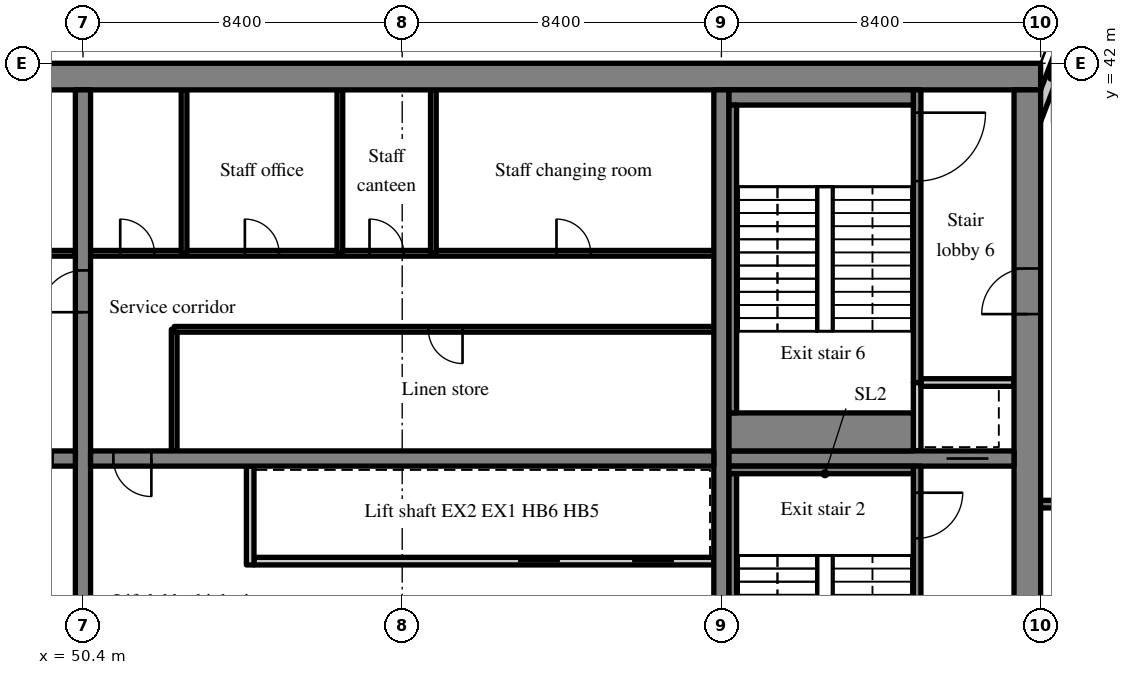
"""IFC4 building model, lengths in metres.
Left out: names, types, materials, properties, quantities, classifications, styles, units other than length and angle.
Written with IfcOpenShell. Run it as: python <this file> out.ifc"""

import sys

from ifc_helpers import new_model, si_unit, direction, frame, frame_2d, origin, place, context, subcontext, project, spatial, rectangle, extrude, source, transform, mapped, element, fill, save


model = new_model("IFC4")
c1 = context("Model", 3, precision=1e-05, world=origin(), true_north=direction((0.0, 1.0)))
c2 = subcontext(c1, "Body", "Model", "MODEL_VIEW")
j1 = project(units=[si_unit("LENGTHUNIT", "METRE"), si_unit("PLANEANGLEUNIT", "RADIAN")], contexts=[c1])
p1 = place(None, origin())
s1 = spatial("IfcSite", under=j1, at=p1, CompositionType="ELEMENT")
p2 = place(p1, origin())
s2 = spatial("IfcBuilding", under=s1, at=p2, CompositionType="ELEMENT")
p3 = place(p2, frame((0.0, 0.0, 174.4)))
s3 = spatial("IfcBuildingStorey", under=s2, at=p3, CompositionType="ELEMENT", Elevation=174.4)
m1 = source(origin(), c2, "Body", "SweptSolid", [
    extrude(rectangle(XDim=50.4, YDim=0.7, at=frame_2d((25.2, 0.0))), origin(), (0.0, 0.0, 1.0), 3.52),
])
p4 = place(p3, frame((25.2, 41.65, 0.0), z_axis=(0.0, 0.0, 1.0), x_axis=(1.0, 0.0, 0.0)))
e1 = element("IfcWall", 1, at=p4, inside=s3, PredefinedType="SHEAR", context=c2, shape_type="MappedRepresentation", body=[
    mapped(m1, transform((0.0, 0.0, 0.0), scale=1.0)),
])
m2 = source(origin(), c2, "Body", "SweptSolid", [
    extrude(rectangle(XDim=18.6, YDim=0.7, at=frame_2d((9.3, 0.0))), origin(), (0.0, 0.0, 1.0), 3.52),
])
p5 = place(p3, frame((75.25, 22.7, 0.0), z_axis=(0.0, 0.0, 1.0), x_axis=(0.0, 1.0, 0.0)))
e2 = element("IfcWall", 2, at=p5, inside=s3, PredefinedType="SHEAR", context=c2, shape_type="MappedRepresentation", body=[
    mapped(m2, transform((0.0, 0.0, 0.0), scale=1.0)),
])
m3 = source(origin(), c2, "Body", "SweptSolid", [
    extrude(rectangle(XDim=1.2, YDim=2.1, at=frame_2d((0.6, 1.05))), frame((0.0, 0.36, 0.0), z_axis=(0.0, -1.0, 0.0), x_axis=(1.0, 0.0, 0.0)), (0.0, 0.0, 1.0), 0.72),
])
p6 = place(p5, frame((12.7, 0.0, 0.0)))
e3 = element("IfcOpeningElement", 3, at=p6, cuts=e2, PredefinedType="OPENING", context=c2, shape_type="MappedRepresentation", body=[
    mapped(m3, transform((0.0, 0.0, 0.0), scale=1.0)),
])
m4 = source(origin(), c2, "Body", "SweptSolid", [
    extrude(rectangle(XDim=18.6, YDim=0.4, at=frame_2d((9.3, 0.0))), origin(), (0.0, 0.0, 1.0), 3.52),
])
p7 = place(p3, frame((50.4, 22.7, 0.0), z_axis=(0.0, 0.0, 1.0), x_axis=(0.0, 1.0, 0.0)))
e4 = element("IfcWall", 4, at=p7, inside=s3, PredefinedType="SHEAR", context=c2, shape_type="MappedRepresentation", body=[
    mapped(m4, transform((0.0, 0.0, 0.0), scale=1.0)),
])
m5 = source(origin(), c2, "Body", "SweptSolid", [
    extrude(rectangle(XDim=1.1, YDim=2.1, at=frame_2d((0.55, 1.05))), frame((0.0, 0.21, 0.0), z_axis=(0.0, -1.0, 0.0), x_axis=(1.0, 0.0, 0.0)), (0.0, 0.0, 1.0), 0.42),
])
p8 = place(p7, frame((12.75, 0.0, 0.0)))
e5 = element("IfcOpeningElement", 5, at=p8, cuts=e4, PredefinedType="OPENING", context=c2, shape_type="MappedRepresentation", body=[
    mapped(m5, transform((0.0, 0.0, 0.0), scale=1.0)),
])
p9 = place(p3, frame((67.2, 22.7, 0.0), z_axis=(0.0, 0.0, 1.0), x_axis=(0.0, 1.0, 0.0)))
e6 = element("IfcWall", 6, at=p9, inside=s3, PredefinedType="SHEAR", context=c2, shape_type="MappedRepresentation", body=[
    mapped(m4, transform((0.0, 0.0, 0.0), scale=1.0)),
])
m6 = source(origin(), c2, "Body", "SweptSolid", [
    extrude(rectangle(XDim=16.4, YDim=0.4, at=frame_2d((8.2, 0.0))), origin(), (0.0, 0.0, 1.0), 3.52),
])
p10 = place(p3, frame((33.8, 31.6, 0.0), z_axis=(0.0, 0.0, 1.0), x_axis=(1.0, 0.0, 0.0)))
e7 = element("IfcWall", 7, at=p10, inside=s3, PredefinedType="SHEAR", context=c2, shape_type="MappedRepresentation", body=[
    mapped(m6, transform((0.0, 0.0, 0.0), scale=1.0)),
])
m7 = source(origin(), c2, "Body", "SweptSolid", [
    extrude(rectangle(XDim=1.0, YDim=2.1, at=frame_2d((0.5, 1.05))), frame((0.0, 0.21, 0.0), z_axis=(0.0, -1.0, 0.0), x_axis=(1.0, 0.0, 0.0)), (0.0, 0.0, 1.0), 0.42),
])
p11 = place(p10, frame((14.8, 0.0, 0.0)))
e8 = element("IfcOpeningElement", 8, at=p11, cuts=e7, PredefinedType="OPENING", context=c2, shape_type="MappedRepresentation", body=[
    mapped(m7, transform((0.0, 0.0, 0.0), scale=1.0)),
])
p12 = place(p3, frame((50.6, 31.6, 0.0), z_axis=(0.0, 0.0, 1.0), x_axis=(1.0, 0.0, 0.0)))
e9 = element("IfcWall", 9, at=p12, inside=s3, PredefinedType="SHEAR", context=c2, shape_type="MappedRepresentation", body=[
    mapped(m6, transform((0.0, 0.0, 0.0), scale=1.0)),
])
p13 = place(p12, frame((0.6, 0.0, 0.0)))
e10 = element("IfcOpeningElement", 10, at=p13, cuts=e9, PredefinedType="OPENING", context=c2, shape_type="MappedRepresentation", body=[
    mapped(m7, transform((0.0, 0.0, 0.0), scale=1.0)),
])
m8 = source(origin(), c2, "Body", "SweptSolid", [
    extrude(rectangle(XDim=7.5, YDim=0.4, at=frame_2d((3.75, 0.0))), origin(), (0.0, 0.0, 1.0), 3.52),
])
p14 = place(p3, frame((67.4, 31.6, 0.0), z_axis=(0.0, 0.0, 1.0), x_axis=(1.0, 0.0, 0.0)))
e11 = element("IfcWall", 11, at=p14, inside=s3, PredefinedType="SHEAR", context=c2, shape_type="MappedRepresentation", body=[
    mapped(m8, transform((0.0, 0.0, 0.0), scale=1.0)),
])
p15 = place(p14, frame((5.725, 0.0, 0.0)))
e12 = element("IfcOpeningElement", 12, at=p15, cuts=e11, PredefinedType="OPENING", context=c2, shape_type="MappedRepresentation", body=[
    mapped(m5, transform((0.0, 0.0, 0.0), scale=1.0)),
])
m9 = source(origin(), c2, "Body", "SweptSolid", [
    extrude(rectangle(XDim=3.559, YDim=0.3, at=frame_2d((1.78, 0.0))), origin(), (0.0, 0.0, 1.0), 3.52),
])
p16 = place(p3, frame((76.523, 43.292, 0.0), z_axis=(0.0, 0.0, 1.0), x_axis=(-0.35779745313, -0.933799219604, 0.0)))
e13 = element("IfcWall", 13, at=p16, inside=s3, PredefinedType="SOLIDWALL", context=c2, shape_type="MappedRepresentation", body=[
    mapped(m9, transform((0.0, 0.0, 0.0), scale=1.0)),
])
m10 = source(origin(), c2, "Body", "SweptSolid", [
    extrude(rectangle(XDim=1.5, YDim=2.0, at=frame_2d((0.75, 1.0))), frame((0.0, 0.16, 0.0), z_axis=(0.0, -1.0, 0.0), x_axis=(1.0, 0.0, 0.0)), (0.0, 0.0, 1.0), 0.32),
])
p17 = place(p16, frame((0.156, 0.0, 0.9)))
e14 = element("IfcOpeningElement", 14, at=p17, cuts=e13, PredefinedType="OPENING", context=c2, shape_type="MappedRepresentation", body=[
    mapped(m10, transform((0.0, 0.0, 0.0), scale=1.0)),
])
m11 = source(origin(), c2, "Body", "SweptSolid", [
    extrude(rectangle(XDim=16.4, YDim=0.15, at=frame_2d((8.2, 0.0))), origin(), (0.0, 0.0, 1.0), 3.52),
])
p18 = place(p3, frame((33.8, 37.0, 0.0), z_axis=(0.0, 0.0, 1.0), x_axis=(1.0, 0.0, 0.0)))
e15 = element("IfcWall", 15, at=p18, inside=s3, PredefinedType="PARTITIONING", context=c2, shape_type="MappedRepresentation", body=[
    mapped(m11, transform((0.0, 0.0, 0.0), scale=1.0)),
])
m12 = source(origin(), c2, "Body", "SweptSolid", [
    extrude(rectangle(XDim=0.9, YDim=2.1, at=frame_2d((0.45, 1.05))), frame((0.0, 0.085, 0.0), z_axis=(0.0, -1.0, 0.0), x_axis=(1.0, 0.0, 0.0)), (0.0, 0.0, 1.0), 0.17),
])
p19 = place(p18, frame((1.6, 0.0, 0.0)))
e16 = element("IfcOpeningElement", 16, at=p19, cuts=e15, PredefinedType="OPENING", context=c2, shape_type="MappedRepresentation", body=[
    mapped(m12, transform((0.0, 0.0, 0.0), scale=1.0)),
])
p20 = place(p18, frame((7.34, 0.0, 0.0)))
e17 = element("IfcOpeningElement", 17, at=p20, cuts=e15, PredefinedType="OPENING", context=c2, shape_type="MappedRepresentation", body=[
    mapped(m12, transform((0.0, 0.0, 0.0), scale=1.0)),
])
p21 = place(p18, frame((12.26, 0.0, 0.0)))
e18 = element("IfcOpeningElement", 18, at=p21, cuts=e15, PredefinedType="OPENING", context=c2, shape_type="MappedRepresentation", body=[
    mapped(m12, transform((0.0, 0.0, 0.0), scale=1.0)),
])
p22 = place(p18, frame((14.72, 0.0, 0.0)))
e19 = element("IfcOpeningElement", 19, at=p22, cuts=e15, PredefinedType="OPENING", context=c2, shape_type="MappedRepresentation", body=[
    mapped(m12, transform((0.0, 0.0, 0.0), scale=1.0)),
])
m13 = source(origin(), c2, "Body", "SweptSolid", [
    extrude(rectangle(XDim=12.1, YDim=0.2, at=frame_2d((6.05, 0.0))), origin(), (0.0, 0.0, 1.0), 3.52),
])
p23 = place(p3, frame((67.0, 28.9, 0.0), z_axis=(0.0, 0.0, 1.0), x_axis=(-1.0, 0.0, 0.0)))
e20 = element("IfcWall", 20, at=p23, inside=s3, PredefinedType="SOLIDWALL", context=c2, shape_type="MappedRepresentation", body=[
    mapped(m13, transform((0.0, 0.0, 0.0), scale=1.0)),
])
m14 = source(origin(), c2, "Body", "SweptSolid", [
    extrude(rectangle(XDim=1.1, YDim=2.1, at=frame_2d((0.55, 1.05))), frame((0.0, 0.11, 0.0), z_axis=(0.0, -1.0, 0.0), x_axis=(1.0, 0.0, 0.0)), (0.0, 0.0, 1.0), 0.22),
])
p24 = place(p23, frame((1.05, 0.0, 0.0)))
e21 = element("IfcOpeningElement", 21, at=p24, cuts=e20, PredefinedType="OPENING", context=c2, shape_type="MappedRepresentation", body=[
    mapped(m14, transform((0.0, 0.0, 0.0), scale=1.0)),
])
p25 = place(p23, frame((4.05, 0.0, 0.0)))
e22 = element("IfcOpeningElement", 22, at=p25, cuts=e20, PredefinedType="OPENING", context=c2, shape_type="MappedRepresentation", body=[
    mapped(m14, transform((0.0, 0.0, 0.0), scale=1.0)),
])
m15 = source(origin(), c2, "Body", "SweptSolid", [
    extrude(rectangle(XDim=2.6, YDim=0.2, at=frame_2d((1.3, 0.0))), origin(), (0.0, 0.0, 1.0), 3.52),
])
p26 = place(p3, frame((54.8, 28.8, 0.0), z_axis=(0.0, 0.0, 1.0), x_axis=(0.0, 1.0, 0.0)))
e23 = element("IfcWall", 23, at=p26, inside=s3, PredefinedType="SOLIDWALL", context=c2, shape_type="MappedRepresentation", body=[
    mapped(m15, transform((0.0, 0.0, 0.0), scale=1.0)),
])
m16 = source(origin(), c2, "Body", "SweptSolid", [
    extrude(rectangle(XDim=3.2, YDim=0.15, at=frame_2d((1.6, 0.0))), origin(), (0.0, 0.0, 1.0), 3.52),
])
p27 = place(p3, frame((52.8, 31.8, 0.0), z_axis=(0.0, 0.0, 1.0), x_axis=(0.0, 1.0, 0.0)))
e24 = element("IfcWall", 24, at=p27, inside=s3, PredefinedType="PARTITIONING", context=c2, shape_type="MappedRepresentation", body=[
    mapped(m16, transform((0.0, 0.0, 0.0), scale=1.0)),
])
m17 = source(origin(), c2, "Body", "SweptSolid", [
    extrude(rectangle(XDim=14.2, YDim=0.15, at=frame_2d((7.1, 0.0))), origin(), (0.0, 0.0, 1.0), 3.52),
])
p28 = place(p3, frame((67.0, 35.0, 0.0), z_axis=(0.0, 0.0, 1.0), x_axis=(-1.0, 0.0, 0.0)))
e25 = element("IfcWall", 25, at=p28, inside=s3, PredefinedType="PARTITIONING", context=c2, shape_type="MappedRepresentation", body=[
    mapped(m17, transform((0.0, 0.0, 0.0), scale=1.0)),
])
p29 = place(p28, frame((6.612, 0.0, 0.0)))
e26 = element("IfcOpeningElement", 26, at=p29, cuts=e25, PredefinedType="OPENING", context=c2, shape_type="MappedRepresentation", body=[
    mapped(m12, transform((0.0, 0.0, 0.0), scale=1.0)),
])
p30 = place(p3, frame((67.0, 37.0, 0.0), z_axis=(0.0, 0.0, 1.0), x_axis=(-1.0, 0.0, 0.0)))
e27 = element("IfcWall", 27, at=p30, inside=s3, PredefinedType="PARTITIONING", context=c2, shape_type="MappedRepresentation", body=[
    mapped(m11, transform((0.0, 0.0, 0.0), scale=1.0)),
])
p31 = place(p30, frame((3.24, 0.0, 0.0)))
e28 = element("IfcOpeningElement", 28, at=p31, cuts=e27, PredefinedType="OPENING", context=c2, shape_type="MappedRepresentation", body=[
    mapped(m12, transform((0.0, 0.0, 0.0), scale=1.0)),
])
p32 = place(p30, frame((8.16, 0.0, 0.0)))
e29 = element("IfcOpeningElement", 29, at=p32, cuts=e27, PredefinedType="OPENING", context=c2, shape_type="MappedRepresentation", body=[
    mapped(m12, transform((0.0, 0.0, 0.0), scale=1.0)),
])
p33 = place(p30, frame((11.44, 0.0, 0.0)))
e30 = element("IfcOpeningElement", 30, at=p33, cuts=e27, PredefinedType="OPENING", context=c2, shape_type="MappedRepresentation", body=[
    mapped(m12, transform((0.0, 0.0, 0.0), scale=1.0)),
])
p34 = place(p30, frame((14.72, 0.0, 0.0)))
e31 = element("IfcOpeningElement", 31, at=p34, cuts=e27, PredefinedType="OPENING", context=c2, shape_type="MappedRepresentation", body=[
    mapped(m12, transform((0.0, 0.0, 0.0), scale=1.0)),
])
m18 = source(origin(), c2, "Body", "SweptSolid", [
    extrude(rectangle(XDim=4.3, YDim=0.15, at=frame_2d((2.15, 0.0))), origin(), (0.0, 0.0, 1.0), 3.52),
])
for number, where, z_axis, x_axis in (
    (32, (59.62, 37.0, 0.0), (0.0, 0.0, 1.0), (0.0, 1.0, 0.0)),
    (33, (57.16, 37.0, 0.0), (0.0, 0.0, 1.0), (0.0, 1.0, 0.0)),
    (34, (53.06, 37.0, 0.0), (0.0, 0.0, 1.0), (0.0, 1.0, 0.0)),
):
    element("IfcWall", number, at=place(p3, frame(where, z_axis=z_axis, x_axis=x_axis)), inside=s3, PredefinedType="PARTITIONING", context=c2, shape_type="MappedRepresentation", body=[
        mapped(m18, transform((0.0, 0.0, 0.0), scale=1.0)),
    ])
m19 = source(origin(), c2, "Body", "SweptSolid", [
    extrude(rectangle(XDim=8.7, YDim=0.2, at=frame_2d((4.35, 0.0))), origin(), (0.0, 0.0, 1.0), 3.52),
])
p35 = place(p3, frame((72.35, 22.7, 0.0), z_axis=(0.0, 0.0, 1.0), x_axis=(0.0, 1.0, 0.0)))
e35 = element("IfcWall", 35, at=p35, inside=s3, PredefinedType="SOLIDWALL", context=c2, shape_type="MappedRepresentation", body=[
    mapped(m19, transform((0.0, 0.0, 0.0), scale=1.0)),
])
m20 = source(origin(), c2, "Body", "SweptSolid", [
    extrude(rectangle(XDim=1.2, YDim=2.1, at=frame_2d((0.6, 1.05))), frame((0.0, 0.11, 0.0), z_axis=(0.0, -1.0, 0.0), x_axis=(1.0, 0.0, 0.0)), (0.0, 0.0, 1.0), 0.22),
])
p36 = place(p35, frame((6.8, 0.0, 0.0)))
e36 = element("IfcOpeningElement", 36, at=p36, cuts=e35, PredefinedType="OPENING", context=c2, shape_type="MappedRepresentation", body=[
    mapped(m20, transform((0.0, 0.0, 0.0), scale=1.0)),
])
m21 = source(origin(), c2, "Body", "SweptSolid", [
    extrude(rectangle(XDim=1.8, YDim=0.2, at=frame_2d((0.9, 0.0))), origin(), (0.0, 0.0, 1.0), 3.52),
])
p37 = place(p3, frame((72.35, 31.8, 0.0), z_axis=(0.0, 0.0, 1.0), x_axis=(0.0, 1.0, 0.0)))
e37 = element("IfcWall", 37, at=p37, inside=s3, PredefinedType="SOLIDWALL", context=c2, shape_type="MappedRepresentation", body=[
    mapped(m21, transform((0.0, 0.0, 0.0), scale=1.0)),
])
m22 = source(origin(), c2, "Body", "SweptSolid", [
    extrude(rectangle(XDim=2.45, YDim=0.2, at=frame_2d((1.225, 0.0))), origin(), (0.0, 0.0, 1.0), 3.52),
])
p38 = place(p3, frame((72.45, 33.6, 0.0), z_axis=(0.0, 0.0, 1.0), x_axis=(1.0, 0.0, 0.0)))
e38 = element("IfcWall", 38, at=p38, inside=s3, PredefinedType="SOLIDWALL", context=c2, shape_type="MappedRepresentation", body=[
    mapped(m22, transform((0.0, 0.0, 0.0), scale=1.0)),
])
m23 = source(origin(), c2, "Body", "SweptSolid", [
    extrude(rectangle(XDim=7.7, YDim=0.2, at=frame_2d((3.85, 0.0))), origin(), (0.0, 0.0, 1.0), 3.52),
])
p39 = place(p3, frame((72.35, 33.6, 0.0), z_axis=(0.0, 0.0, 1.0), x_axis=(0.0, 1.0, 0.0)))
e39 = element("IfcWall", 39, at=p39, inside=s3, PredefinedType="SOLIDWALL", context=c2, shape_type="MappedRepresentation", body=[
    mapped(m23, transform((0.0, 0.0, 0.0), scale=1.0)),
])
m24 = source(origin(), c2, "Body", "SweptSolid", [
    extrude(rectangle(XDim=1.8, YDim=2.1, at=frame_2d((0.9, 1.05))), frame((0.0, 0.11, 0.0), z_axis=(0.0, -1.0, 0.0), x_axis=(1.0, 0.0, 0.0)), (0.0, 0.0, 1.0), 0.22),
])
p40 = place(p39, frame((5.3, 0.0, 0.0)))
e40 = element("IfcOpeningElement", 40, at=p40, cuts=e39, PredefinedType="OPENING", context=c2, shape_type="MappedRepresentation", body=[
    mapped(m24, transform((0.0, 0.0, 0.0), scale=1.0)),
])
m25 = source(origin(), c2, "Body", "SweptSolid", [
    extrude(rectangle(XDim=8.25, YDim=0.2, at=frame_2d((4.125, 0.0))), origin(), (0.0, 0.0, 1.0), 3.52),
])
p41 = place(p3, frame((83.85, 30.4, 0.0), z_axis=(0.0, 0.0, 1.0), x_axis=(-1.0, 0.0, 0.0)))
e41 = element("IfcWall", 41, at=p41, inside=s3, PredefinedType="SOLIDWALL", context=c2, shape_type="MappedRepresentation", body=[
    mapped(m25, transform((0.0, 0.0, 0.0), scale=1.0)),
])
m26 = source(origin(), c2, "Body", "SweptSolid", [
    extrude(rectangle(XDim=1.0, YDim=2.1, at=frame_2d((0.5, 1.05))), frame((0.0, 0.11, 0.0), z_axis=(0.0, -1.0, 0.0), x_axis=(1.0, 0.0, 0.0)), (0.0, 0.0, 1.0), 0.22),
])
p42 = place(p41, frame((6.15, 0.0, 0.0)))
e42 = element("IfcOpeningElement", 42, at=p42, cuts=e41, PredefinedType="OPENING", context=c2, shape_type="MappedRepresentation", body=[
    mapped(m26, transform((0.0, 0.0, 0.0), scale=1.0)),
])
m27 = source(origin(), c2, "Body", "SweptSolid", [
    extrude(rectangle(XDim=4.85, YDim=0.2, at=frame_2d((2.425, 0.0))), origin(), (0.0, 0.0, 1.0), 3.52),
])
p43 = place(p3, frame((67.4, 31.3, 0.0), z_axis=(0.0, 0.0, 1.0), x_axis=(1.0, 0.0, 0.0)))
e43 = element("IfcWall", 43, at=p43, inside=s3, PredefinedType="SOLIDWALL", context=c2, shape_type="MappedRepresentation", body=[
    mapped(m27, transform((0.0, 0.0, 0.0), scale=1.0)),
])
m28 = source(origin(), c2, "Body", "SweptSolid", [
    extrude(rectangle(XDim=8.1, YDim=0.2, at=frame_2d((4.05, 0.0))), origin(), (0.0, 0.0, 1.0), 3.52),
])
p44 = place(p3, frame((67.5, 23.1, 0.0), z_axis=(0.0, 0.0, 1.0), x_axis=(0.0, 1.0, 0.0)))
e44 = element("IfcWall", 44, at=p44, inside=s3, PredefinedType="SOLIDWALL", context=c2, shape_type="MappedRepresentation", body=[
    mapped(m28, transform((0.0, 0.0, 0.0), scale=1.0)),
])
m29 = source(origin(), c2, "Body", "SweptSolid", [
    extrude(rectangle(XDim=4.85, YDim=0.4, at=frame_2d((2.425, 0.0))), origin(), (0.0, 0.0, 1.0), 3.52),
])
p45 = place(p3, frame((67.4, 41.1, 0.0), z_axis=(0.0, 0.0, 1.0), x_axis=(1.0, 0.0, 0.0)))
e45 = element("IfcWall", 45, at=p45, inside=s3, PredefinedType="SOLIDWALL", context=c2, shape_type="MappedRepresentation", body=[
    mapped(m29, transform((0.0, 0.0, 0.0), scale=1.0)),
])
m30 = source(origin(), c2, "Body", "SweptSolid", [
    extrude(rectangle(XDim=4.85, YDim=1.0, at=frame_2d((2.425, 0.0))), origin(), (0.0, 0.0, 1.0), 3.52),
])
p46 = place(p3, frame((67.4, 32.3, 0.0), z_axis=(0.0, 0.0, 1.0), x_axis=(1.0, 0.0, 0.0)))
e46 = element("IfcWall", 46, at=p46, inside=s3, PredefinedType="SOLIDWALL", context=c2, shape_type="MappedRepresentation", body=[
    mapped(m30, transform((0.0, 0.0, 0.0), scale=1.0)),
])
p47 = place(p3, frame((67.5, 32.8, 0.0), z_axis=(0.0, 0.0, 1.0), x_axis=(0.0, 1.0, 0.0)))
e47 = element("IfcWall", 47, at=p47, inside=s3, PredefinedType="SOLIDWALL", context=c2, shape_type="MappedRepresentation", body=[
    mapped(m28, transform((0.0, 0.0, 0.0), scale=1.0)),
])
m31 = source(origin(), c2, "Body", "SweptSolid", [
    extrude(rectangle(XDim=1.0, YDim=2.1, at=frame_2d((0.5, 1.05))), frame((0.0, 0.025, 0.0), z_axis=(0.0, -1.0, 0.0), x_axis=(1.0, 0.0, 0.0)), (0.0, 0.0, 1.0), 0.05),
])
p48 = place(p13, origin())
e48 = element("IfcDoor", 48, at=p48, inside=s3, OperationType="SINGLE_SWING_RIGHT", PredefinedType="DOOR", context=c2, shape_type="MappedRepresentation", body=[
    mapped(m31, transform((0.0, 0.0, 0.0), scale=1.0)),
])
fill(e10, e48)
m32 = source(origin(), c2, "Body", "SweptSolid", [
    extrude(rectangle(XDim=1.1, YDim=2.1, at=frame_2d((0.55, 1.05))), frame((0.0, 0.025, 0.0), z_axis=(0.0, -1.0, 0.0), x_axis=(1.0, 0.0, 0.0)), (0.0, 0.0, 1.0), 0.05),
])
p49 = place(p24, origin())
e49 = element("IfcDoor", 49, at=p49, inside=s3, OperationType="SLIDING_TO_RIGHT", PredefinedType="DOOR", context=c2, shape_type="MappedRepresentation", body=[
    mapped(m32, transform((0.0, 0.0, 0.0), scale=1.0)),
])
fill(e21, e49)
p50 = place(p25, origin())
e50 = element("IfcDoor", 50, at=p50, inside=s3, OperationType="SLIDING_TO_LEFT", PredefinedType="DOOR", context=c2, shape_type="MappedRepresentation", body=[
    mapped(m32, transform((0.0, 0.0, 0.0), scale=1.0)),
])
fill(e22, e50)
m33 = source(origin(), c2, "Body", "SweptSolid", [
    extrude(rectangle(XDim=0.9, YDim=2.1, at=frame_2d((0.45, 1.05))), frame((0.0, 0.025, 0.0), z_axis=(0.0, -1.0, 0.0), x_axis=(1.0, 0.0, 0.0)), (0.0, 0.0, 1.0), 0.05),
])
p51 = place(p29, origin())
e51 = element("IfcDoor", 51, at=p51, inside=s3, OperationType="SINGLE_SWING_LEFT", PredefinedType="DOOR", context=c2, shape_type="MappedRepresentation", body=[
    mapped(m33, transform((0.0, 0.0, 0.0), scale=1.0)),
])
fill(e26, e51)
p52 = place(p31, origin())
e52 = element("IfcDoor", 52, at=p52, inside=s3, OperationType="SINGLE_SWING_RIGHT", PredefinedType="DOOR", context=c2, shape_type="MappedRepresentation", body=[
    mapped(m33, transform((0.0, 0.0, 0.0), scale=1.0)),
])
fill(e28, e52)
p53 = place(p32, origin())
e53 = element("IfcDoor", 53, at=p53, inside=s3, OperationType="SINGLE_SWING_RIGHT", PredefinedType="DOOR", context=c2, shape_type="MappedRepresentation", body=[
    mapped(m33, transform((0.0, 0.0, 0.0), scale=1.0)),
])
fill(e29, e53)
p54 = place(p33, origin())
e54 = element("IfcDoor", 54, at=p54, inside=s3, OperationType="SINGLE_SWING_RIGHT", PredefinedType="DOOR", context=c2, shape_type="MappedRepresentation", body=[
    mapped(m33, transform((0.0, 0.0, 0.0), scale=1.0)),
])
fill(e30, e54)
p55 = place(p34, origin())
e55 = element("IfcDoor", 55, at=p55, inside=s3, OperationType="SINGLE_SWING_RIGHT", PredefinedType="DOOR", context=c2, shape_type="MappedRepresentation", body=[
    mapped(m33, transform((0.0, 0.0, 0.0), scale=1.0)),
])
fill(e31, e55)
m34 = source(origin(), c2, "Body", "SweptSolid", [
    extrude(rectangle(XDim=1.2, YDim=2.1, at=frame_2d((0.6, 1.05))), frame((0.0, 0.025, 0.0), z_axis=(0.0, -1.0, 0.0), x_axis=(1.0, 0.0, 0.0)), (0.0, 0.0, 1.0), 0.05),
])
p56 = place(p36, origin())
e56 = element("IfcDoor", 56, at=p56, inside=s3, OperationType="SINGLE_SWING_RIGHT", PredefinedType="DOOR", context=c2, shape_type="MappedRepresentation", body=[
    mapped(m34, transform((0.0, 0.0, 0.0), scale=1.0)),
])
fill(e36, e56)
p57 = place(p15, origin())
e57 = element("IfcDoor", 57, at=p57, inside=s3, OperationType="SLIDING_TO_LEFT", PredefinedType="DOOR", context=c2, shape_type="MappedRepresentation", body=[
    mapped(m32, transform((0.0, 0.0, 0.0), scale=1.0)),
])
fill(e12, e57)
m35 = source(origin(), c2, "Body", "SweptSolid", [
    extrude(rectangle(XDim=1.8, YDim=2.1, at=frame_2d((0.9, 1.05))), frame((0.0, 0.025, 0.0), z_axis=(0.0, -1.0, 0.0), x_axis=(1.0, 0.0, 0.0)), (0.0, 0.0, 1.0), 0.05),
])
p58 = place(p40, origin())
e58 = element("IfcDoor", 58, at=p58, inside=s3, OperationType="SINGLE_SWING_RIGHT", PredefinedType="DOOR", context=c2, shape_type="MappedRepresentation", body=[
    mapped(m35, transform((0.0, 0.0, 0.0), scale=1.0)),
])
fill(e40, e58)
p59 = place(p6, origin())
e59 = element("IfcDoor", 59, at=p59, inside=s3, OperationType="SINGLE_SWING_LEFT", PredefinedType="DOOR", context=c2, shape_type="MappedRepresentation", body=[
    mapped(m34, transform((0.0, 0.0, 0.0), scale=1.0)),
])
fill(e3, e59)
p60 = place(p8, origin())
e60 = element("IfcDoor", 60, at=p60, inside=s3, OperationType="SINGLE_SWING_LEFT", PredefinedType="DOOR", context=c2, shape_type="MappedRepresentation", body=[
    mapped(m32, transform((0.0, 0.0, 0.0), scale=1.0)),
])
fill(e5, e60)
save(model, sys.argv[1])
